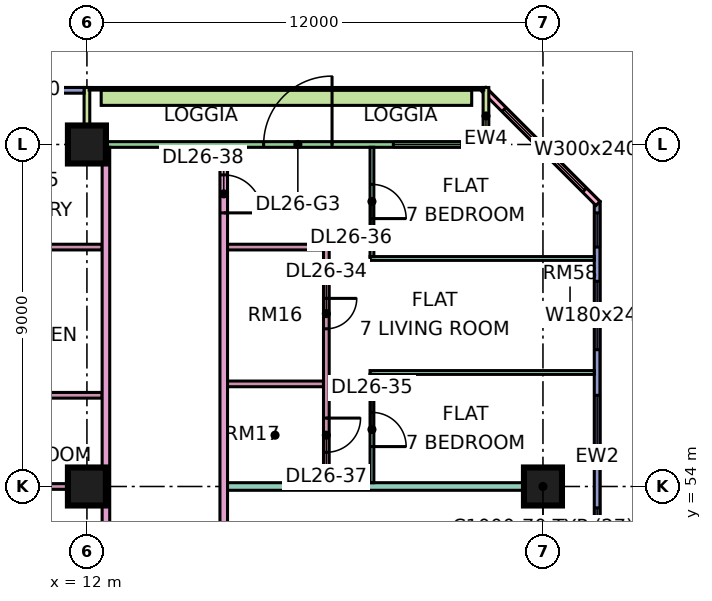
"""IFC4 building model, lengths in metres.
Left out: names, types, materials, properties, quantities, classifications, styles, units other than length and angle.
Written with IfcOpenShell. Run it as: python <this file> out.ifc"""

import sys

from ifc_helpers import new_model, si_unit, direction, frame, frame_2d, origin, origin_2d, place, context, subcontext, project, spatial, rectangle, extrude, element, fill, save


model = new_model("IFC4")
c1 = context("Model", 3, precision=1e-05, world=origin(), true_north=direction((0.0, 1.0)))
c2 = subcontext(c1, "Body", "Model", "MODEL_VIEW")
j1 = project(units=[si_unit("LENGTHUNIT", "METRE"), si_unit("PLANEANGLEUNIT", "RADIAN")], contexts=[c1])
p1 = place(None, origin())
s1 = spatial("IfcSite", under=j1, at=p1, CompositionType="ELEMENT")
p2 = place(p1, origin())
s2 = spatial("IfcBuilding", under=s1, at=p2, CompositionType="ELEMENT")
p3 = place(p2, frame((0.0, 0.0, 114.4)))
s3 = spatial("IfcBuildingStorey", under=s2, at=p3, CompositionType="ELEMENT", Elevation=114.4)
for number, where, z_axis, x_axis in (
    (1, (12.0, 54.0, 0.0), (0.0, 0.0, 1.0), (1.0, 0.0, 0.0)),
    (2, (12.0, 63.0, 0.0), (0.0, 0.0, 1.0), (1.0, 0.0, 0.0)),
    (3, (24.0, 54.0, 0.0), (0.0, 0.0, 1.0), (1.0, 0.0, 0.0)),
):
    element("IfcColumn", number, at=place(p3, frame(where, z_axis=z_axis, x_axis=x_axis)), inside=s3, PredefinedType="COLUMN", context=c2, shape_type="SweptSolid", body=[
        extrude(rectangle(XDim=1.0, YDim=1.0, at=origin_2d()), origin(), (0.0, 0.0, 1.0), 3.75),
    ])
p4 = place(p3, frame((25.425, 48.075, 0.0), z_axis=(0.0, 0.0, 1.0), x_axis=(0.0, 1.0, 0.0)))
e4 = element("IfcWall", 4, at=p4, inside=s3, PredefinedType="SOLIDWALL", context=c2, shape_type="SweptSolid", body=[
    extrude(rectangle(XDim=13.425, YDim=0.15, at=frame_2d((6.712, 0.0))), origin(), (0.0, 0.0, 1.0), 3.35),
])
p5 = place(p4, frame((0.562, 0.0, 0.45)))
e5 = element("IfcOpeningElement", 5, at=p5, cuts=e4, PredefinedType="OPENING", context=c2, shape_type="SweptSolid", body=[
    extrude(rectangle(XDim=4.8, YDim=2.4, at=frame_2d((2.4, 1.2))), frame((0.0, 0.085, 0.0), z_axis=(0.0, -1.0, 0.0), x_axis=(1.0, 0.0, 0.0)), (0.0, 0.0, 1.0), 0.17),
])
p6 = place(p4, frame((6.525, 0.0, 0.45)))
e6 = element("IfcOpeningElement", 6, at=p6, cuts=e4, PredefinedType="OPENING", context=c2, shape_type="SweptSolid", body=[
    extrude(rectangle(XDim=1.8, YDim=2.4, at=frame_2d((0.9, 1.2))), frame((0.0, 0.085, 0.0), z_axis=(0.0, -1.0, 0.0), x_axis=(1.0, 0.0, 0.0)), (0.0, 0.0, 1.0), 0.17),
])
p7 = place(p4, frame((9.525, 0.0, 0.45)))
e7 = element("IfcOpeningElement", 7, at=p7, cuts=e4, PredefinedType="OPENING", context=c2, shape_type="SweptSolid", body=[
    extrude(rectangle(XDim=1.8, YDim=2.4, at=frame_2d((0.9, 1.2))), frame((0.0, 0.085, 0.0), z_axis=(0.0, -1.0, 0.0), x_axis=(1.0, 0.0, 0.0)), (0.0, 0.0, 1.0), 0.17),
])
p8 = place(p4, frame((12.225, 0.0, 0.45)))
e8 = element("IfcOpeningElement", 8, at=p8, cuts=e4, PredefinedType="OPENING", context=c2, shape_type="SweptSolid", body=[
    extrude(rectangle(XDim=0.9, YDim=2.4, at=frame_2d((0.45, 1.2))), frame((0.0, 0.085, 0.0), z_axis=(0.0, -1.0, 0.0), x_axis=(1.0, 0.0, 0.0)), (0.0, 0.0, 1.0), 0.17),
])
p9 = place(p3, frame((25.447, 61.447, 0.0), z_axis=(0.0, 0.0, 1.0), x_axis=(-0.707106781187, 0.707106781187, 0.0)))
e9 = element("IfcWall", 9, at=p9, inside=s3, PredefinedType="SOLIDWALL", context=c2, shape_type="SweptSolid", body=[
    extrude(rectangle(XDim=4.243, YDim=0.15, at=frame_2d((2.121, 0.0))), origin(), (0.0, 0.0, 1.0), 3.35),
])
p10 = place(p9, frame((0.498, 0.0, 0.45)))
e10 = element("IfcOpeningElement", 10, at=p10, cuts=e9, PredefinedType="OPENING", context=c2, shape_type="SweptSolid", body=[
    extrude(rectangle(XDim=3.0, YDim=2.4, at=frame_2d((1.5, 1.2))), frame((0.0, 0.085, 0.0), z_axis=(0.0, -1.0, 0.0), x_axis=(1.0, 0.0, 0.0)), (0.0, 0.0, 1.0), 0.17),
])
p11 = place(p3, frame((22.425, 63.0, 0.0), z_axis=(0.0, 0.0, 1.0), x_axis=(-1.0, 0.0, 0.0)))
e11 = element("IfcWall", 11, at=p11, inside=s3, PredefinedType="SOLIDWALL", context=c2, shape_type="SweptSolid", body=[
    extrude(rectangle(XDim=10.35, YDim=0.15, at=frame_2d((5.175, 0.0))), origin(), (0.0, 0.0, 1.0), 3.35),
])
p12 = place(p11, frame((0.562, 0.0, 0.45)))
e12 = element("IfcOpeningElement", 12, at=p12, cuts=e11, PredefinedType="OPENING", context=c2, shape_type="SweptSolid", body=[
    extrude(rectangle(XDim=1.8, YDim=2.4, at=frame_2d((0.9, 1.2))), frame((0.0, 0.085, 0.0), z_axis=(0.0, -1.0, 0.0), x_axis=(1.0, 0.0, 0.0)), (0.0, 0.0, 1.0), 0.17),
])
p13 = place(p11, frame((3.975, 0.0, 0.0)))
e13 = element("IfcOpeningElement", 13, at=p13, cuts=e11, PredefinedType="OPENING", context=c2, shape_type="SweptSolid", body=[
    extrude(rectangle(XDim=1.8, YDim=2.4, at=frame_2d((0.9, 1.2))), frame((0.0, 0.085, 0.0), z_axis=(0.0, -1.0, 0.0), x_axis=(1.0, 0.0, 0.0)), (0.0, 0.0, 1.0), 0.17),
])
for number, where, z_axis, x_axis in (
    (14, (22.5, 64.5, 0.0), (0.0, 0.0, 1.0), (0.0, -1.0, 0.0)),
    (15, (12.0, 64.5, 0.0), (0.0, 0.0, 1.0), (0.0, -1.0, 0.0)),
):
    element("IfcWall", number, at=place(p3, frame(where, z_axis=z_axis, x_axis=x_axis)), inside=s3, PredefinedType="SOLIDWALL", context=c2, shape_type="SweptSolid", body=[
        extrude(rectangle(XDim=1.5, YDim=0.15, at=frame_2d((0.75, 0.0))), origin(), (0.0, 0.0, 1.0), 3.35),
    ])
p14 = place(p3, frame((11.925, 64.425, 0.0), z_axis=(0.0, 0.0, 1.0), x_axis=(-1.0, 0.0, 0.0)))
e16 = element("IfcWall", 16, at=p14, inside=s3, PredefinedType="SOLIDWALL", context=c2, shape_type="SweptSolid", body=[
    extrude(rectangle(XDim=10.425, YDim=0.15, at=frame_2d((5.212, 0.0))), origin(), (0.0, 0.0, 1.0), 3.35),
])
p15 = place(p14, frame((1.212, 0.0, 1.7)))
e17 = element("IfcOpeningElement", 17, at=p15, cuts=e16, PredefinedType="OPENING", context=c2, shape_type="SweptSolid", body=[
    extrude(rectangle(XDim=1.2, YDim=0.9, at=frame_2d((0.6, 0.45))), frame((0.0, 0.085, 0.0), z_axis=(0.0, -1.0, 0.0), x_axis=(1.0, 0.0, 0.0)), (0.0, 0.0, 1.0), 0.17),
])
p16 = place(p14, frame((6.125, 0.0, 0.45)))
e18 = element("IfcOpeningElement", 18, at=p16, cuts=e16, PredefinedType="OPENING", context=c2, shape_type="SweptSolid", body=[
    extrude(rectangle(XDim=3.0, YDim=2.4, at=frame_2d((1.5, 1.2))), frame((0.0, 0.085, 0.0), z_axis=(0.0, -1.0, 0.0), x_axis=(1.0, 0.0, 0.0)), (0.0, 0.0, 1.0), 0.17),
])
p17 = place(p3, frame((22.125, 64.229, 0.0), z_axis=(0.0, 0.0, 1.0), x_axis=(-1.0, 0.0, 0.0)))
e19 = element("IfcWall", 19, at=p17, inside=s3, PredefinedType="SOLIDWALL", context=c2, shape_type="SweptSolid", body=[
    extrude(rectangle(XDim=9.75, YDim=0.4, at=frame_2d((4.875, 0.0))), origin(), (0.0, 0.0, 1.0), 0.7),
])
for number, where, z_axis, x_axis in (
    (20, (8.375, 54.0, 0.0), (0.0, 0.0, 1.0), (1.0, 0.0, 0.0)),
    (21, (8.375, 56.4, 0.0), (0.0, 0.0, 1.0), (1.0, 0.0, 0.0)),
    (22, (8.375, 60.3, 0.0), (0.0, 0.0, 1.0), (1.0, 0.0, 0.0)),
):
    element("IfcWall", number, at=place(p3, frame(where, z_axis=z_axis, x_axis=x_axis)), inside=s3, PredefinedType="PARTITIONING", context=c2, shape_type="SweptSolid", body=[
        extrude(rectangle(XDim=4.025, YDim=0.15, at=frame_2d((2.012, 0.0))), origin(), (0.0, 0.0, 1.0), 3.35),
    ])
p18 = place(p3, frame((12.5, 20.0, 0.0), z_axis=(0.0, 0.0, 1.0), x_axis=(0.0, 1.0, 0.0)))
e23 = element("IfcWall", 23, at=p18, inside=s3, PredefinedType="PARTITIONING", context=c2, shape_type="SweptSolid", body=[
    extrude(rectangle(XDim=42.926, YDim=0.2, at=frame_2d((21.463, 0.0))), origin(), (0.0, 0.0, 1.0), 3.35),
])
p19 = place(p18, frame((28.65, 0.0, 0.0)))
e24 = element("IfcOpeningElement", 24, at=p19, cuts=e23, PredefinedType="OPENING", context=c2, shape_type="SweptSolid", body=[
    extrude(rectangle(XDim=1.0, YDim=2.1, at=frame_2d((0.5, 1.05))), frame((0.0, 0.11, 0.0), z_axis=(0.0, -1.0, 0.0), x_axis=(1.0, 0.0, 0.0)), (0.0, 0.0, 1.0), 0.22),
])
p20 = place(p18, frame((31.95, 0.0, 0.0)))
e25 = element("IfcOpeningElement", 25, at=p20, cuts=e23, PredefinedType="OPENING", context=c2, shape_type="SweptSolid", body=[
    extrude(rectangle(XDim=1.0, YDim=2.1, at=frame_2d((0.5, 1.05))), frame((0.0, 0.11, 0.0), z_axis=(0.0, -1.0, 0.0), x_axis=(1.0, 0.0, 0.0)), (0.0, 0.0, 1.0), 0.22),
])
p21 = place(p18, frame((0.6, 0.0, 0.0)))
e26 = element("IfcOpeningElement", 26, at=p21, cuts=e23, PredefinedType="OPENING", context=c2, shape_type="SweptSolid", body=[
    extrude(rectangle(XDim=1.2, YDim=2.1, at=frame_2d((0.6, 1.05))), frame((0.0, 0.11, 0.0), z_axis=(0.0, -1.0, 0.0), x_axis=(1.0, 0.0, 0.0)), (0.0, 0.0, 1.0), 0.22),
])
p22 = place(p18, frame((4.65, 0.0, 0.0)))
e27 = element("IfcOpeningElement", 27, at=p22, cuts=e23, PredefinedType="OPENING", context=c2, shape_type="SweptSolid", body=[
    extrude(rectangle(XDim=1.0, YDim=2.1, at=frame_2d((0.5, 1.05))), frame((0.0, 0.11, 0.0), z_axis=(0.0, -1.0, 0.0), x_axis=(1.0, 0.0, 0.0)), (0.0, 0.0, 1.0), 0.22),
])
p23 = place(p3, frame((15.6, 51.225, 0.0), z_axis=(0.0, 0.0, 1.0), x_axis=(0.0, 1.0, 0.0)))
e28 = element("IfcWall", 28, at=p23, inside=s3, PredefinedType="PARTITIONING", context=c2, shape_type="SweptSolid", body=[
    extrude(rectangle(XDim=11.701, YDim=0.2, at=frame_2d((5.851, 0.0))), origin(), (0.0, 0.0, 1.0), 3.35),
])
p24 = place(p23, frame((9.975, 0.0, 0.0)))
e29 = element("IfcOpeningElement", 29, at=p24, cuts=e28, PredefinedType="OPENING", context=c2, shape_type="SweptSolid", body=[
    extrude(rectangle(XDim=1.0, YDim=2.1, at=frame_2d((0.5, 1.05))), frame((0.0, 0.11, 0.0), z_axis=(0.0, -1.0, 0.0), x_axis=(1.0, 0.0, 0.0)), (0.0, 0.0, 1.0), 0.22),
])
p25 = place(p3, frame((15.7, 54.0, 0.0), z_axis=(0.0, 0.0, 1.0), x_axis=(1.0, 0.0, 0.0)))
e30 = element("IfcWall", 30, at=p25, inside=s3, PredefinedType="PARTITIONING", context=c2, shape_type="SweptSolid", body=[
    extrude(rectangle(XDim=8.3, YDim=0.2, at=frame_2d((4.15, 0.0))), origin(), (0.0, 0.0, 1.0), 3.35),
])
for number, where, z_axis, x_axis in (
    (31, (15.7, 56.7, 0.0), (0.0, 0.0, 1.0), (1.0, 0.0, 0.0)),
    (32, (15.7, 60.3, 0.0), (0.0, 0.0, 1.0), (1.0, 0.0, 0.0)),
):
    element("IfcWall", number, at=place(p3, frame(where, z_axis=z_axis, x_axis=x_axis)), inside=s3, PredefinedType="PARTITIONING", context=c2, shape_type="SweptSolid", body=[
        extrude(rectangle(XDim=2.525, YDim=0.15, at=frame_2d((1.263, 0.0))), origin(), (0.0, 0.0, 1.0), 3.35),
    ])
p26 = place(p3, frame((18.3, 54.1, 0.0), z_axis=(0.0, 0.0, 1.0), x_axis=(0.0, 1.0, 0.0)))
e33 = element("IfcWall", 33, at=p26, inside=s3, PredefinedType="PARTITIONING", context=c2, shape_type="SweptSolid", body=[
    extrude(rectangle(XDim=6.275, YDim=0.15, at=frame_2d((3.137, 0.0))), origin(), (0.0, 0.0, 1.0), 3.35),
])
p27 = place(p26, frame((4.05, 0.0, 0.0)))
e34 = element("IfcOpeningElement", 34, at=p27, cuts=e33, PredefinedType="OPENING", context=c2, shape_type="SweptSolid", body=[
    extrude(rectangle(XDim=0.8, YDim=2.1, at=frame_2d((0.4, 1.05))), frame((0.0, 0.085, 0.0), z_axis=(0.0, -1.0, 0.0), x_axis=(1.0, 0.0, 0.0)), (0.0, 0.0, 1.0), 0.17),
])
p28 = place(p26, frame((0.8, 0.0, 0.0)))
e35 = element("IfcOpeningElement", 35, at=p28, cuts=e33, PredefinedType="OPENING", context=c2, shape_type="SweptSolid", body=[
    extrude(rectangle(XDim=0.9, YDim=2.1, at=frame_2d((0.45, 1.05))), frame((0.0, 0.085, 0.0), z_axis=(0.0, -1.0, 0.0), x_axis=(1.0, 0.0, 0.0)), (0.0, 0.0, 1.0), 0.17),
])
for number, where, z_axis, x_axis in (
    (36, (19.45, 57.0, 0.0), (0.0, 0.0, 1.0), (1.0, 0.0, 0.0)),
    (37, (19.45, 60.0, 0.0), (0.0, 0.0, 1.0), (1.0, 0.0, 0.0)),
):
    element("IfcWall", number, at=place(p3, frame(where, z_axis=z_axis, x_axis=x_axis)), inside=s3, PredefinedType="PARTITIONING", context=c2, shape_type="SweptSolid", body=[
        extrude(rectangle(XDim=5.9, YDim=0.1, at=frame_2d((2.95, 0.0))), origin(), (0.0, 0.0, 1.0), 3.35),
    ])
p29 = place(p3, frame((19.5, 54.1, 0.0), z_axis=(0.0, 0.0, 1.0), x_axis=(0.0, 1.0, 0.0)))
e38 = element("IfcWall", 38, at=p29, inside=s3, PredefinedType="PARTITIONING", context=c2, shape_type="SweptSolid", body=[
    extrude(rectangle(XDim=2.85, YDim=0.1, at=frame_2d((1.425, 0.0))), origin(), (0.0, 0.0, 1.0), 3.35),
])
p30 = place(p29, frame((0.95, 0.0, 0.0)))
e39 = element("IfcOpeningElement", 39, at=p30, cuts=e38, PredefinedType="OPENING", context=c2, shape_type="SweptSolid", body=[
    extrude(rectangle(XDim=0.9, YDim=2.1, at=frame_2d((0.45, 1.05))), frame((0.0, 0.06, 0.0), z_axis=(0.0, -1.0, 0.0), x_axis=(1.0, 0.0, 0.0)), (0.0, 0.0, 1.0), 0.12),
])
p31 = place(p3, frame((19.5, 60.05, 0.0), z_axis=(0.0, 0.0, 1.0), x_axis=(0.0, 1.0, 0.0)))
e40 = element("IfcWall", 40, at=p31, inside=s3, PredefinedType="PARTITIONING", context=c2, shape_type="SweptSolid", body=[
    extrude(rectangle(XDim=2.876, YDim=0.1, at=frame_2d((1.438, 0.0))), origin(), (0.0, 0.0, 1.0), 3.35),
])
p32 = place(p31, frame((1.0, 0.0, 0.0)))
e41 = element("IfcOpeningElement", 41, at=p32, cuts=e40, PredefinedType="OPENING", context=c2, shape_type="SweptSolid", body=[
    extrude(rectangle(XDim=0.9, YDim=2.1, at=frame_2d((0.45, 1.05))), frame((0.0, 0.06, 0.0), z_axis=(0.0, -1.0, 0.0), x_axis=(1.0, 0.0, 0.0)), (0.0, 0.0, 1.0), 0.12),
])
p33 = place(p5, origin())
e42 = element("IfcWindow", 42, at=p33, inside=s3, PartitioningType="SINGLE_PANEL", PredefinedType="WINDOW", context=c2, shape_type="SweptSolid", body=[
    extrude(rectangle(XDim=4.8, YDim=2.4, at=frame_2d((2.4, 1.2))), frame((0.0, 0.03, 0.0), z_axis=(0.0, -1.0, 0.0), x_axis=(1.0, 0.0, 0.0)), (0.0, 0.0, 1.0), 0.06),
])
fill(e5, e42)
p34 = place(p6, origin())
e43 = element("IfcWindow", 43, at=p34, inside=s3, PartitioningType="SINGLE_PANEL", PredefinedType="WINDOW", context=c2, shape_type="SweptSolid", body=[
    extrude(rectangle(XDim=1.8, YDim=2.4, at=frame_2d((0.9, 1.2))), frame((0.0, 0.03, 0.0), z_axis=(0.0, -1.0, 0.0), x_axis=(1.0, 0.0, 0.0)), (0.0, 0.0, 1.0), 0.06),
])
fill(e6, e43)
p35 = place(p7, origin())
e44 = element("IfcWindow", 44, at=p35, inside=s3, PartitioningType="SINGLE_PANEL", PredefinedType="WINDOW", context=c2, shape_type="SweptSolid", body=[
    extrude(rectangle(XDim=1.8, YDim=2.4, at=frame_2d((0.9, 1.2))), frame((0.0, 0.03, 0.0), z_axis=(0.0, -1.0, 0.0), x_axis=(1.0, 0.0, 0.0)), (0.0, 0.0, 1.0), 0.06),
])
fill(e7, e44)
p36 = place(p8, origin())
e45 = element("IfcWindow", 45, at=p36, inside=s3, PartitioningType="SINGLE_PANEL", PredefinedType="WINDOW", context=c2, shape_type="SweptSolid", body=[
    extrude(rectangle(XDim=0.9, YDim=2.4, at=frame_2d((0.45, 1.2))), frame((0.0, 0.03, 0.0), z_axis=(0.0, -1.0, 0.0), x_axis=(1.0, 0.0, 0.0)), (0.0, 0.0, 1.0), 0.06),
])
fill(e8, e45)
p37 = place(p10, origin())
e46 = element("IfcWindow", 46, at=p37, inside=s3, PartitioningType="SINGLE_PANEL", PredefinedType="WINDOW", context=c2, shape_type="SweptSolid", body=[
    extrude(rectangle(XDim=3.0, YDim=2.4, at=frame_2d((1.5, 1.2))), frame((0.0, 0.03, 0.0), z_axis=(0.0, -1.0, 0.0), x_axis=(1.0, 0.0, 0.0)), (0.0, 0.0, 1.0), 0.06),
])
fill(e10, e46)
p38 = place(p12, origin())
e47 = element("IfcWindow", 47, at=p38, inside=s3, PartitioningType="SINGLE_PANEL", PredefinedType="WINDOW", context=c2, shape_type="SweptSolid", body=[
    extrude(rectangle(XDim=1.8, YDim=2.4, at=frame_2d((0.9, 1.2))), frame((0.0, 0.03, 0.0), z_axis=(0.0, -1.0, 0.0), x_axis=(1.0, 0.0, 0.0)), (0.0, 0.0, 1.0), 0.06),
])
fill(e12, e47)
p39 = place(p13, frame((1.8, 0.0, 0.0), z_axis=(0.0, 0.0, 1.0), x_axis=(-1.0, 0.0, 0.0)))
e48 = element("IfcDoor", 48, at=p39, inside=s3, OperationType="DOUBLE_DOOR_SINGLE_SWING", PredefinedType="DOOR", context=c2, shape_type="SweptSolid", body=[
    extrude(rectangle(XDim=1.8, YDim=2.4, at=frame_2d((0.9, 1.2))), frame((0.0, 0.025, 0.0), z_axis=(0.0, -1.0, 0.0), x_axis=(1.0, 0.0, 0.0)), (0.0, 0.0, 1.0), 0.05),
])
fill(e13, e48)
p40 = place(p27, origin())
e49 = element("IfcDoor", 49, at=p40, inside=s3, OperationType="SINGLE_SWING_RIGHT", PredefinedType="DOOR", context=c2, shape_type="SweptSolid", body=[
    extrude(rectangle(XDim=0.8, YDim=2.1, at=frame_2d((0.4, 1.05))), frame((0.0, 0.025, 0.0), z_axis=(0.0, -1.0, 0.0), x_axis=(1.0, 0.0, 0.0)), (0.0, 0.0, 1.0), 0.05),
])
fill(e34, e49)
p41 = place(p30, frame((0.9, 0.0, 0.0), z_axis=(0.0, 0.0, 1.0), x_axis=(-1.0, 0.0, 0.0)))
e50 = element("IfcDoor", 50, at=p41, inside=s3, OperationType="SINGLE_SWING_LEFT", PredefinedType="DOOR", context=c2, shape_type="SweptSolid", body=[
    extrude(rectangle(XDim=0.9, YDim=2.1, at=frame_2d((0.45, 1.05))), frame((0.0, 0.025, 0.0), z_axis=(0.0, -1.0, 0.0), x_axis=(1.0, 0.0, 0.0)), (0.0, 0.0, 1.0), 0.05),
])
fill(e39, e50)
p42 = place(p32, frame((0.9, 0.0, 0.0), z_axis=(0.0, 0.0, 1.0), x_axis=(-1.0, 0.0, 0.0)))
e51 = element("IfcDoor", 51, at=p42, inside=s3, OperationType="SINGLE_SWING_LEFT", PredefinedType="DOOR", context=c2, shape_type="SweptSolid", body=[
    extrude(rectangle(XDim=0.9, YDim=2.1, at=frame_2d((0.45, 1.05))), frame((0.0, 0.025, 0.0), z_axis=(0.0, -1.0, 0.0), x_axis=(1.0, 0.0, 0.0)), (0.0, 0.0, 1.0), 0.05),
])
fill(e41, e51)
p43 = place(p28, origin())
e52 = element("IfcDoor", 52, at=p43, inside=s3, OperationType="SINGLE_SWING_RIGHT", PredefinedType="DOOR", context=c2, shape_type="SweptSolid", body=[
    extrude(rectangle(XDim=0.9, YDim=2.1, at=frame_2d((0.45, 1.05))), frame((0.0, 0.025, 0.0), z_axis=(0.0, -1.0, 0.0), x_axis=(1.0, 0.0, 0.0)), (0.0, 0.0, 1.0), 0.05),
])
fill(e35, e52)
p44 = place(p24, frame((1.0, 0.0, 0.0), z_axis=(0.0, 0.0, 1.0), x_axis=(-1.0, 0.0, 0.0)))
e53 = element("IfcDoor", 53, at=p44, inside=s3, OperationType="SINGLE_SWING_LEFT", PredefinedType="DOOR", context=c2, shape_type="SweptSolid", body=[
    extrude(rectangle(XDim=1.0, YDim=2.1, at=frame_2d((0.5, 1.05))), frame((0.0, 0.025, 0.0), z_axis=(0.0, -1.0, 0.0), x_axis=(1.0, 0.0, 0.0)), (0.0, 0.0, 1.0), 0.05),
])
fill(e29, e53)
save(model, sys.argv[1])
